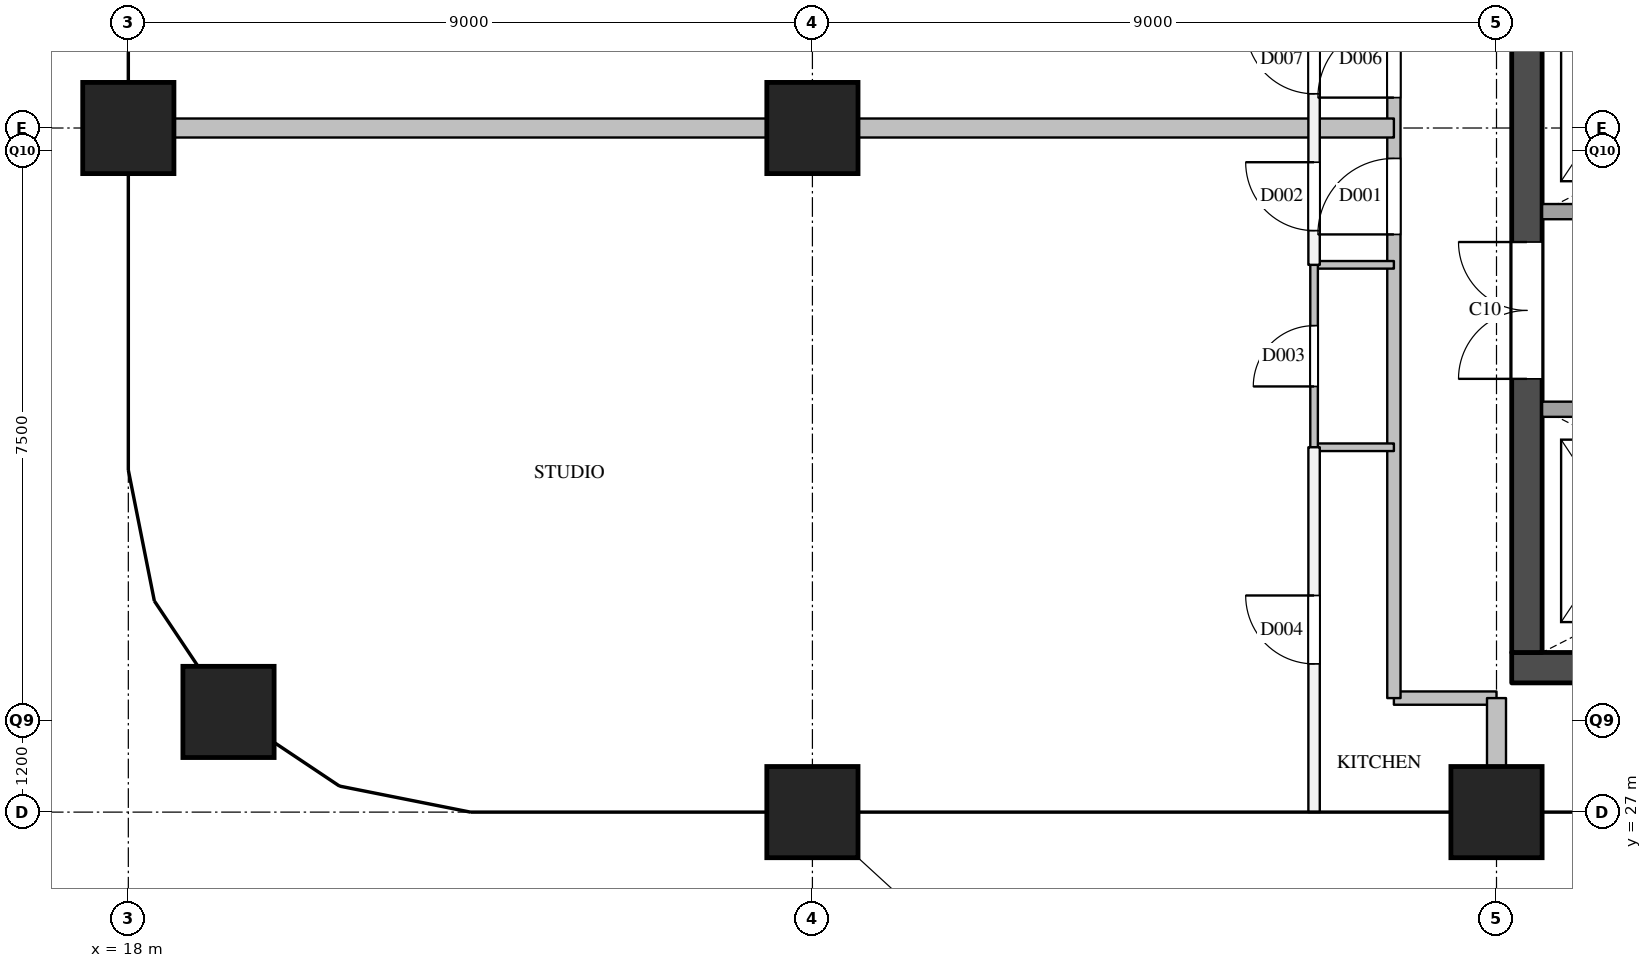
"""IFC4 building model, lengths in metres.
Left out: names, types, materials, properties, quantities, classifications, styles, units other than length and angle.
Written with IfcOpenShell. Run it as: python <this file> out.ifc"""

import sys

from ifc_helpers import new_model, si_unit, direction, frame, frame_2d, origin, origin_2d, place, context, subcontext, project, spatial, rectangle, extrude, element, fill, save


model = new_model("IFC4")
c1 = context("Model", 3, precision=1e-05, world=origin(), true_north=direction((0.0, 1.0)))
c2 = subcontext(c1, "Body", "Model", "MODEL_VIEW")
j1 = project(units=[si_unit("LENGTHUNIT", "METRE"), si_unit("PLANEANGLEUNIT", "RADIAN")], contexts=[c1])
p1 = place(None, origin())
s1 = spatial("IfcSite", under=j1, at=p1, CompositionType="ELEMENT")
p2 = place(p1, origin())
s2 = spatial("IfcBuilding", under=s1, at=p2, CompositionType="ELEMENT")
p3 = place(p2, frame((0.0, 0.0, 273.5)))
s3 = spatial("IfcBuildingStorey", under=s2, at=p3, CompositionType="ELEMENT", Elevation=273.5)
for number, where, z_axis, x_axis in (
    (1, (19.318, 28.318, 0.0), (0.0, 0.0, 1.0), (1.0, 0.0, 0.0)),
    (2, (18.0, 36.0, 0.0), (0.0, 0.0, 1.0), (1.0, 0.0, 0.0)),
    (3, (27.0, 27.0, 0.0), (0.0, 0.0, 1.0), (1.0, 0.0, 0.0)),
    (4, (27.0, 36.0, 0.0), (0.0, 0.0, 1.0), (1.0, 0.0, 0.0)),
    (5, (36.0, 27.0, 0.0), (0.0, 0.0, 1.0), (1.0, 0.0, 0.0)),
):
    element("IfcColumn", number, at=place(p3, frame(where, z_axis=z_axis, x_axis=x_axis)), inside=s3, PredefinedType="COLUMN", context=c2, shape_type="SweptSolid", body=[
        extrude(rectangle(XDim=1.2, YDim=1.2, at=origin_2d()), origin(), (0.0, 0.0, 1.0), 3.9),
    ])
p4 = place(p3, frame((36.2, 28.9, 0.0), z_axis=(0.0, 0.0, 1.0), x_axis=(1.0, 0.0, 0.0)))
e6 = element("IfcWall", 6, at=p4, inside=s3, PredefinedType="SHEAR", context=c2, shape_type="SweptSolid", body=[
    extrude(rectangle(XDim=12.0, YDim=0.4, at=frame_2d((6.0, 0.0))), origin(), (0.0, 0.0, 1.0), 3.6),
])
p5 = place(p4, frame((0.85, 0.0, 0.0)))
e7 = element("IfcOpeningElement", 7, at=p5, cuts=e6, PredefinedType="OPENING", context=c2, shape_type="SweptSolid", body=[
    extrude(rectangle(XDim=1.2, YDim=2.1, at=frame_2d((0.6, 1.05))), frame((0.0, 0.21, 0.0), z_axis=(0.0, -1.0, 0.0), x_axis=(1.0, 0.0, 0.0)), (0.0, 0.0, 1.0), 0.42),
])
p6 = place(p4, frame((2.95, 0.0, 0.0)))
e8 = element("IfcOpeningElement", 8, at=p6, cuts=e6, PredefinedType="OPENING", context=c2, shape_type="SweptSolid", body=[
    extrude(rectangle(XDim=1.2, YDim=2.1, at=frame_2d((0.6, 1.05))), frame((0.0, 0.21, 0.0), z_axis=(0.0, -1.0, 0.0), x_axis=(1.0, 0.0, 0.0)), (0.0, 0.0, 1.0), 0.42),
])
p7 = place(p4, frame((5.05, 0.0, 0.0)))
e9 = element("IfcOpeningElement", 9, at=p7, cuts=e6, PredefinedType="OPENING", context=c2, shape_type="SweptSolid", body=[
    extrude(rectangle(XDim=1.2, YDim=2.1, at=frame_2d((0.6, 1.05))), frame((0.0, 0.21, 0.0), z_axis=(0.0, -1.0, 0.0), x_axis=(1.0, 0.0, 0.0)), (0.0, 0.0, 1.0), 0.42),
])
p8 = place(p3, frame((36.4, 29.1, 0.0), z_axis=(0.0, 0.0, 1.0), x_axis=(0.0, 1.0, 0.0)))
e10 = element("IfcWall", 10, at=p8, inside=s3, PredefinedType="SHEAR", context=c2, shape_type="SweptSolid", body=[
    extrude(rectangle(XDim=20.3, YDim=0.4, at=frame_2d((10.15, 0.0))), origin(), (0.0, 0.0, 1.0), 3.6),
])
p9 = place(p8, frame((3.6, 0.0, 0.0)))
e11 = element("IfcOpeningElement", 11, at=p9, cuts=e10, PredefinedType="OPENING", context=c2, shape_type="SweptSolid", body=[
    extrude(rectangle(XDim=1.8, YDim=2.1, at=frame_2d((0.9, 1.05))), frame((0.0, 0.21, 0.0), z_axis=(0.0, -1.0, 0.0), x_axis=(1.0, 0.0, 0.0)), (0.0, 0.0, 1.0), 0.42),
])
p10 = place(p8, frame((16.4, 0.0, 0.0)))
e12 = element("IfcOpeningElement", 12, at=p10, cuts=e10, PredefinedType="OPENING", context=c2, shape_type="SweptSolid", body=[
    extrude(rectangle(XDim=1.0, YDim=2.1, at=frame_2d((0.5, 1.05))), frame((0.0, 0.21, 0.0), z_axis=(0.0, -1.0, 0.0), x_axis=(1.0, 0.0, 0.0)), (0.0, 0.0, 1.0), 0.42),
])
p11 = place(p3, frame((36.6, 32.3, 0.0), z_axis=(0.0, 0.0, 1.0), x_axis=(1.0, 0.0, 0.0)))
e13 = element("IfcWall", 13, at=p11, inside=s3, PredefinedType="SOLIDWALL", context=c2, shape_type="SweptSolid", body=[
    extrude(rectangle(XDim=11.2, YDim=0.2, at=frame_2d((5.6, 0.0))), origin(), (0.0, 0.0, 1.0), 3.6),
])
p12 = place(p11, frame((7.225, 0.0, 0.0)))
e14 = element("IfcOpeningElement", 14, at=p12, cuts=e13, PredefinedType="OPENING", context=c2, shape_type="SweptSolid", body=[
    extrude(rectangle(XDim=1.2, YDim=2.1, at=frame_2d((0.6, 1.05))), frame((0.0, 0.11, 0.0), z_axis=(0.0, -1.0, 0.0), x_axis=(1.0, 0.0, 0.0)), (0.0, 0.0, 1.0), 0.22),
])
p13 = place(p11, frame((9.475, 0.0, 0.0)))
e15 = element("IfcOpeningElement", 15, at=p13, cuts=e13, PredefinedType="OPENING", context=c2, shape_type="SweptSolid", body=[
    extrude(rectangle(XDim=1.2, YDim=2.1, at=frame_2d((0.6, 1.05))), frame((0.0, 0.11, 0.0), z_axis=(0.0, -1.0, 0.0), x_axis=(1.0, 0.0, 0.0)), (0.0, 0.0, 1.0), 0.22),
])
p14 = place(p3, frame((36.6, 34.9, 0.0), z_axis=(0.0, 0.0, 1.0), x_axis=(1.0, 0.0, 0.0)))
e16 = element("IfcWall", 16, at=p14, inside=s3, PredefinedType="SOLIDWALL", context=c2, shape_type="SweptSolid", body=[
    extrude(rectangle(XDim=6.3, YDim=0.2, at=frame_2d((3.15, 0.0))), origin(), (0.0, 0.0, 1.0), 3.6),
])
p15 = place(p3, frame((34.65, 28.5, 0.0), z_axis=(0.0, 0.0, 1.0), x_axis=(1.0, 0.0, 0.0)))
e17 = element("IfcWall", 17, at=p15, inside=s3, PredefinedType="PARTITIONING", context=c2, shape_type="SweptSolid", body=[
    extrude(rectangle(XDim=1.35, YDim=0.175, at=frame_2d((0.675, 0.0))), origin(), (0.0, 0.0, 1.0), 3.6),
])
p16 = place(p3, frame((34.65, 28.5, 0.0), z_axis=(0.0, 0.0, 1.0), x_axis=(0.0, 1.0, 0.0)))
e18 = element("IfcWall", 18, at=p16, inside=s3, PredefinedType="PARTITIONING", context=c2, shape_type="SweptSolid", body=[
    extrude(rectangle(XDim=22.85, YDim=0.175, at=frame_2d((11.425, 0.0))), origin(), (0.0, 0.0, 1.0), 3.6),
])
p17 = place(p16, frame((6.1, 0.0, 0.0)))
e19 = element("IfcOpeningElement", 19, at=p17, cuts=e18, PredefinedType="OPENING", context=c2, shape_type="SweptSolid", body=[
    extrude(rectangle(XDim=1.0, YDim=2.1, at=frame_2d((0.5, 1.05))), frame((0.0, 0.097, 0.0), z_axis=(0.0, -1.0, 0.0), x_axis=(1.0, 0.0, 0.0)), (0.0, 0.0, 1.0), 0.195),
])
p18 = place(p16, frame((7.9, 0.0, 0.0)))
e20 = element("IfcOpeningElement", 20, at=p18, cuts=e18, PredefinedType="OPENING", context=c2, shape_type="SweptSolid", body=[
    extrude(rectangle(XDim=1.0, YDim=2.1, at=frame_2d((0.5, 1.05))), frame((0.0, 0.097, 0.0), z_axis=(0.0, -1.0, 0.0), x_axis=(1.0, 0.0, 0.0)), (0.0, 0.0, 1.0), 0.195),
])
p19 = place(p3, frame((33.6, 27.0, 0.0), z_axis=(0.0, 0.0, 1.0), x_axis=(0.0, 1.0, 0.0)))
e21 = element("IfcWall", 21, at=p19, inside=s3, PredefinedType="PARTITIONING", context=c2, shape_type="SweptSolid", body=[
    extrude(rectangle(XDim=4.8, YDim=0.15, at=frame_2d((2.4, 0.0))), origin(), (0.0, 0.0, 1.0), 2.6),
])
p20 = place(p19, frame((1.95, 0.0, 0.0)))
e22 = element("IfcOpeningElement", 22, at=p20, cuts=e21, PredefinedType="OPENING", context=c2, shape_type="SweptSolid", body=[
    extrude(rectangle(XDim=0.9, YDim=2.1, at=frame_2d((0.45, 1.05))), frame((0.0, 0.085, 0.0), z_axis=(0.0, -1.0, 0.0), x_axis=(1.0, 0.0, 0.0)), (0.0, 0.0, 1.0), 0.17),
])
p21 = place(p3, frame((33.6, 34.2, 0.0), z_axis=(0.0, 0.0, 1.0), x_axis=(0.0, 1.0, 0.0)))
e23 = element("IfcWall", 23, at=p21, inside=s3, PredefinedType="PARTITIONING", context=c2, shape_type="SweptSolid", body=[
    extrude(rectangle(XDim=3.6, YDim=0.15, at=frame_2d((1.8, 0.0))), origin(), (0.0, 0.0, 1.0), 3.6),
])
p22 = place(p21, frame((0.45, 0.0, 0.0)))
e24 = element("IfcOpeningElement", 24, at=p22, cuts=e23, PredefinedType="OPENING", context=c2, shape_type="SweptSolid", body=[
    extrude(rectangle(XDim=0.9, YDim=2.1, at=frame_2d((0.45, 1.05))), frame((0.0, 0.085, 0.0), z_axis=(0.0, -1.0, 0.0), x_axis=(1.0, 0.0, 0.0)), (0.0, 0.0, 1.0), 0.17),
])
p23 = place(p21, frame((2.25, 0.0, 0.0)))
e25 = element("IfcOpeningElement", 25, at=p23, cuts=e23, PredefinedType="OPENING", context=c2, shape_type="SweptSolid", body=[
    extrude(rectangle(XDim=0.9, YDim=2.1, at=frame_2d((0.45, 1.05))), frame((0.0, 0.085, 0.0), z_axis=(0.0, -1.0, 0.0), x_axis=(1.0, 0.0, 0.0)), (0.0, 0.0, 1.0), 0.17),
])
p24 = place(p3, frame((18.0, 36.0, 0.0), z_axis=(0.0, 0.0, 1.0), x_axis=(1.0, 0.0, 0.0)))
e26 = element("IfcWall", 26, at=p24, inside=s3, PredefinedType="PARTITIONING", context=c2, shape_type="SweptSolid", body=[
    extrude(rectangle(XDim=16.65, YDim=0.25, at=frame_2d((8.325, 0.0))), origin(), (0.0, 0.0, 1.0), 3.6),
])
p25 = place(p3, frame((36.0, 27.0, 0.0), z_axis=(0.0, 0.0, 1.0), x_axis=(0.0, 1.0, 0.0)))
e27 = element("IfcWall", 27, at=p25, inside=s3, PredefinedType="PARTITIONING", context=c2, shape_type="SweptSolid", body=[
    extrude(rectangle(XDim=1.5, YDim=0.25, at=frame_2d((0.75, 0.0))), origin(), (0.0, 0.0, 1.0), 3.6),
])
for number, where, z_axis, x_axis in (
    (28, (33.6, 31.8, 0.0), (0.0, 0.0, 1.0), (1.0, 0.0, 0.0)),
    (29, (33.6, 34.2, 0.0), (0.0, 0.0, 1.0), (1.0, 0.0, 0.0)),
):
    element("IfcWall", number, at=place(p3, frame(where, z_axis=z_axis, x_axis=x_axis)), inside=s3, PredefinedType="PARTITIONING", context=c2, shape_type="SweptSolid", body=[
        extrude(rectangle(XDim=1.05, YDim=0.1, at=frame_2d((0.525, 0.0))), origin(), (0.0, 0.0, 1.0), 3.6),
    ])
p26 = place(p3, frame((33.6, 31.8, 0.0), z_axis=(0.0, 0.0, 1.0), x_axis=(0.0, 1.0, 0.0)))
e30 = element("IfcWall", 30, at=p26, inside=s3, PredefinedType="PARTITIONING", context=c2, shape_type="SweptSolid", body=[
    extrude(rectangle(XDim=2.4, YDim=0.1, at=frame_2d((1.2, 0.0))), origin(), (0.0, 0.0, 1.0), 3.6),
])
p27 = place(p26, frame((0.8, 0.0, 0.0)))
e31 = element("IfcOpeningElement", 31, at=p27, cuts=e30, PredefinedType="OPENING", context=c2, shape_type="SweptSolid", body=[
    extrude(rectangle(XDim=0.8, YDim=2.1, at=frame_2d((0.4, 1.05))), frame((0.0, 0.06, 0.0), z_axis=(0.0, -1.0, 0.0), x_axis=(1.0, 0.0, 0.0)), (0.0, 0.0, 1.0), 0.12),
])
p28 = place(p9, origin())
e32 = element("IfcDoor", 32, at=p28, inside=s3, OperationType="DOUBLE_DOOR_SINGLE_SWING", PredefinedType="DOOR", context=c2, shape_type="SweptSolid", body=[
    extrude(rectangle(XDim=1.8, YDim=2.1, at=frame_2d((0.9, 1.05))), frame((0.0, 0.025, 0.0), z_axis=(0.0, -1.0, 0.0), x_axis=(1.0, 0.0, 0.0)), (0.0, 0.0, 1.0), 0.05),
])
fill(e11, e32)
p29 = place(p17, origin())
e33 = element("IfcDoor", 33, at=p29, inside=s3, OperationType="SINGLE_SWING_LEFT", PredefinedType="DOOR", context=c2, shape_type="SweptSolid", body=[
    extrude(rectangle(XDim=1.0, YDim=2.1, at=frame_2d((0.5, 1.05))), frame((0.0, 0.025, 0.0), z_axis=(0.0, -1.0, 0.0), x_axis=(1.0, 0.0, 0.0)), (0.0, 0.0, 1.0), 0.05),
])
fill(e19, e33)
p30 = place(p22, origin())
e34 = element("IfcDoor", 34, at=p30, inside=s3, OperationType="SINGLE_SWING_RIGHT", PredefinedType="DOOR", context=c2, shape_type="SweptSolid", body=[
    extrude(rectangle(XDim=0.9, YDim=2.1, at=frame_2d((0.45, 1.05))), frame((0.0, 0.025, 0.0), z_axis=(0.0, -1.0, 0.0), x_axis=(1.0, 0.0, 0.0)), (0.0, 0.0, 1.0), 0.05),
])
fill(e24, e34)
p31 = place(p27, origin())
e35 = element("IfcDoor", 35, at=p31, inside=s3, OperationType="SINGLE_SWING_LEFT", PredefinedType="DOOR", context=c2, shape_type="SweptSolid", body=[
    extrude(rectangle(XDim=0.8, YDim=2.1, at=frame_2d((0.4, 1.05))), frame((0.0, 0.025, 0.0), z_axis=(0.0, -1.0, 0.0), x_axis=(1.0, 0.0, 0.0)), (0.0, 0.0, 1.0), 0.05),
])
fill(e31, e35)
p32 = place(p20, origin())
e36 = element("IfcDoor", 36, at=p32, inside=s3, OperationType="SINGLE_SWING_RIGHT", PredefinedType="DOOR", context=c2, shape_type="SweptSolid", body=[
    extrude(rectangle(XDim=0.9, YDim=2.1, at=frame_2d((0.45, 1.05))), frame((0.0, 0.025, 0.0), z_axis=(0.0, -1.0, 0.0), x_axis=(1.0, 0.0, 0.0)), (0.0, 0.0, 1.0), 0.05),
])
fill(e22, e36)
p33 = place(p18, origin())
e37 = element("IfcDoor", 37, at=p33, inside=s3, OperationType="SINGLE_SWING_LEFT", PredefinedType="DOOR", context=c2, shape_type="SweptSolid", body=[
    extrude(rectangle(XDim=1.0, YDim=2.1, at=frame_2d((0.5, 1.05))), frame((0.0, 0.025, 0.0), z_axis=(0.0, -1.0, 0.0), x_axis=(1.0, 0.0, 0.0)), (0.0, 0.0, 1.0), 0.05),
])
fill(e20, e37)
p34 = place(p23, origin())
e38 = element("IfcDoor", 38, at=p34, inside=s3, OperationType="SINGLE_SWING_RIGHT", PredefinedType="DOOR", context=c2, shape_type="SweptSolid", body=[
    extrude(rectangle(XDim=0.9, YDim=2.1, at=frame_2d((0.45, 1.05))), frame((0.0, 0.025, 0.0), z_axis=(0.0, -1.0, 0.0), x_axis=(1.0, 0.0, 0.0)), (0.0, 0.0, 1.0), 0.05),
])
fill(e25, e38)
save(model, sys.argv[1])
